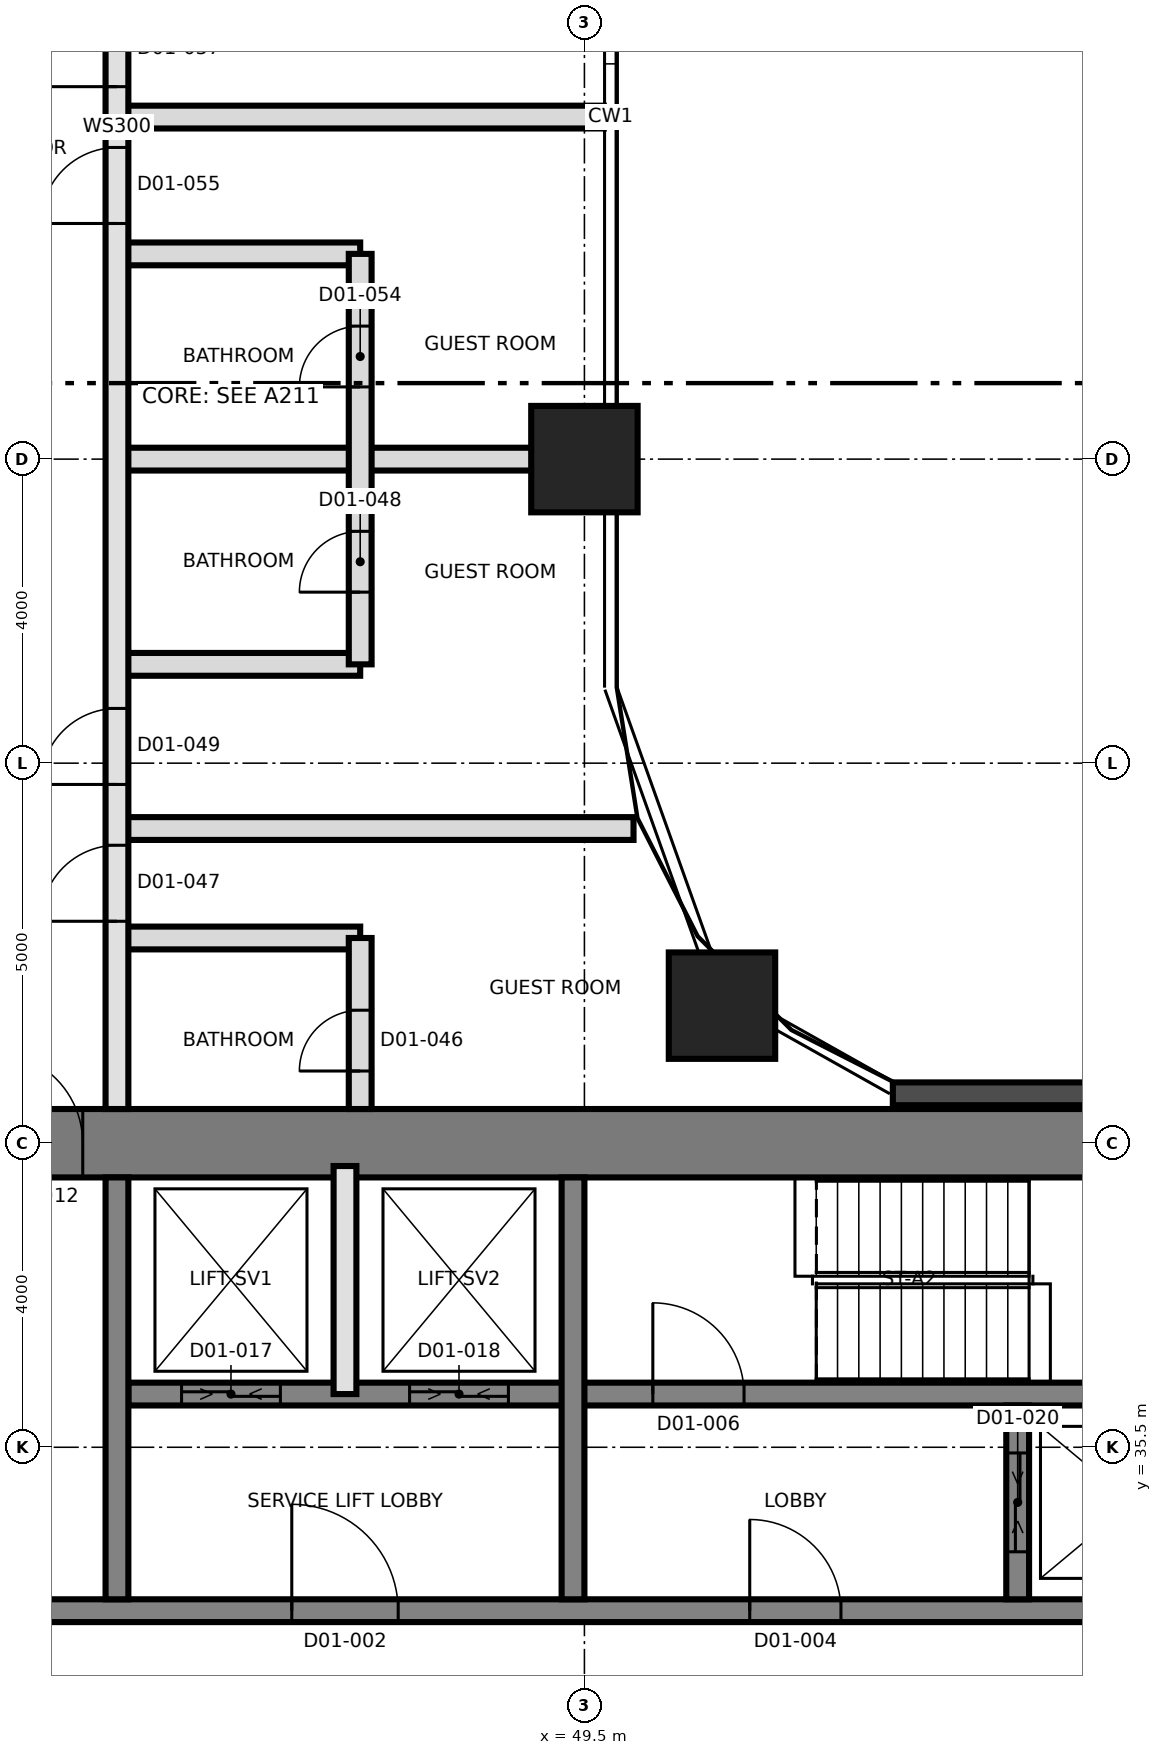
"""IFC4 building model, lengths in metres.
Left out: names, types, materials, properties, quantities, classifications, styles, units other than length and angle.
Written with IfcOpenShell. Run it as: python <this file> out.ifc"""

import sys

from ifc_helpers import new_model, si_unit, direction, frame, frame_2d, origin, origin_2d, place, context, subcontext, project, spatial, rectangle, extrude, element, fill, save


model = new_model("IFC4")
c1 = context("Model", 3, precision=1e-05, world=origin(), true_north=direction((0.0, 1.0)))
c2 = subcontext(c1, "Body", "Model", "MODEL_VIEW")
j1 = project(units=[si_unit("LENGTHUNIT", "METRE"), si_unit("PLANEANGLEUNIT", "RADIAN")], contexts=[c1])
p1 = place(None, origin())
s1 = spatial("IfcSite", under=j1, at=p1, CompositionType="ELEMENT")
p2 = place(p1, origin())
s2 = spatial("IfcBuilding", under=s1, at=p2, CompositionType="ELEMENT")
p3 = place(p2, frame((0.0, 0.0, 40.9)))
s3 = spatial("IfcBuildingStorey", under=s2, at=p3, CompositionType="ELEMENT", Elevation=40.9)
p4 = place(p3, frame((31.05, 39.5, 0.0), z_axis=(0.0, 0.0, 1.0), x_axis=(1.0, 0.0, 0.0)))
e1 = element("IfcWall", 1, at=p4, inside=s3, PredefinedType="SHEAR", context=c2, shape_type="SweptSolid", body=[
    extrude(rectangle(XDim=27.0, YDim=0.9, at=frame_2d((13.5, 0.0))), origin(), (0.0, 0.0, 1.0), 3.7),
])
p5 = place(p4, frame((10.65, 0.0, 0.0)))
e2 = element("IfcOpeningElement", 2, at=p5, cuts=e1, PredefinedType="OPENING", context=c2, shape_type="SweptSolid", body=[
    extrude(rectangle(XDim=1.2, YDim=2.1, at=frame_2d((0.6, 1.05))), frame((0.0, 0.46, 0.0), z_axis=(0.0, -1.0, 0.0), x_axis=(1.0, 0.0, 0.0)), (0.0, 0.0, 1.0), 0.92),
])
p6 = place(p3, frame((31.95, 33.35, 0.0), z_axis=(0.0, 0.0, 1.0), x_axis=(1.0, 0.0, 0.0)))
e3 = element("IfcWall", 3, at=p6, inside=s3, PredefinedType="SHEAR", context=c2, shape_type="SweptSolid", body=[
    extrude(rectangle(XDim=26.1, YDim=0.3, at=frame_2d((13.05, 0.0))), origin(), (0.0, 0.0, 1.0), 3.7),
])
p7 = place(p6, frame((13.7, 0.0, 0.0)))
e4 = element("IfcOpeningElement", 4, at=p7, cuts=e3, PredefinedType="OPENING", context=c2, shape_type="SweptSolid", body=[
    extrude(rectangle(XDim=1.4, YDim=2.1, at=frame_2d((0.7, 1.05))), frame((0.0, 0.16, 0.0), z_axis=(0.0, -1.0, 0.0), x_axis=(1.0, 0.0, 0.0)), (0.0, 0.0, 1.0), 0.32),
])
p8 = place(p6, frame((5.175, 0.0, 0.0)))
e5 = element("IfcOpeningElement", 5, at=p8, cuts=e3, PredefinedType="OPENING", context=c2, shape_type="SweptSolid", body=[
    extrude(rectangle(XDim=1.2, YDim=2.1, at=frame_2d((0.6, 1.05))), frame((0.0, 0.16, 0.0), z_axis=(0.0, -1.0, 0.0), x_axis=(1.0, 0.0, 0.0)), (0.0, 0.0, 1.0), 0.32),
])
p9 = place(p6, frame((19.725, 0.0, 0.0)))
e6 = element("IfcOpeningElement", 6, at=p9, cuts=e3, PredefinedType="OPENING", context=c2, shape_type="SweptSolid", body=[
    extrude(rectangle(XDim=1.2, YDim=2.1, at=frame_2d((0.6, 1.05))), frame((0.0, 0.16, 0.0), z_axis=(0.0, -1.0, 0.0), x_axis=(1.0, 0.0, 0.0)), (0.0, 0.0, 1.0), 0.32),
])
p10 = place(p3, frame((43.5, 36.2, 0.0), z_axis=(0.0, 0.0, 1.0), x_axis=(1.0, 0.0, 0.0)))
e7 = element("IfcWall", 7, at=p10, inside=s3, PredefinedType="SHEAR", context=c2, shape_type="SweptSolid", body=[
    extrude(rectangle(XDim=14.55, YDim=0.3, at=frame_2d((7.275, 0.0))), origin(), (0.0, 0.0, 1.0), 3.7),
])
p11 = place(p10, frame((6.9, 0.0, 0.0)))
e8 = element("IfcOpeningElement", 8, at=p11, cuts=e7, PredefinedType="OPENING", context=c2, shape_type="SweptSolid", body=[
    extrude(rectangle(XDim=1.2, YDim=2.1, at=frame_2d((0.6, 1.05))), frame((0.0, 0.16, 0.0), z_axis=(0.0, -1.0, 0.0), x_axis=(1.0, 0.0, 0.0)), (0.0, 0.0, 1.0), 0.32),
])
p12 = place(p10, frame((0.7, 0.0, 0.0)))
e9 = element("IfcOpeningElement", 9, at=p12, cuts=e7, PredefinedType="OPENING", context=c2, shape_type="SweptSolid", body=[
    extrude(rectangle(XDim=1.3, YDim=2.4, at=frame_2d((0.65, 1.2))), frame((0.0, 0.16, 0.0), z_axis=(0.0, -1.0, 0.0), x_axis=(1.0, 0.0, 0.0)), (0.0, 0.0, 1.0), 0.32),
])
p13 = place(p10, frame((3.7, 0.0, 0.0)))
e10 = element("IfcOpeningElement", 10, at=p13, cuts=e7, PredefinedType="OPENING", context=c2, shape_type="SweptSolid", body=[
    extrude(rectangle(XDim=1.3, YDim=2.4, at=frame_2d((0.65, 1.2))), frame((0.0, 0.16, 0.0), z_axis=(0.0, -1.0, 0.0), x_axis=(1.0, 0.0, 0.0)), (0.0, 0.0, 1.0), 0.32),
])
for number, where, z_axis, x_axis in (
    (11, (43.35, 33.5, 0.0), (0.0, 0.0, 1.0), (0.0, 1.0, 0.0)),
    (12, (49.35, 33.5, 0.0), (0.0, 0.0, 1.0), (0.0, 1.0, 0.0)),
):
    element("IfcWall", number, at=place(p3, frame(where, z_axis=z_axis, x_axis=x_axis)), inside=s3, PredefinedType="SHEAR", context=c2, shape_type="SweptSolid", body=[
        extrude(rectangle(XDim=5.55, YDim=0.3, at=frame_2d((2.775, 0.0))), origin(), (0.0, 0.0, 1.0), 3.7),
    ])
p14 = place(p3, frame((55.2, 33.5, 0.0), z_axis=(0.0, 0.0, 1.0), x_axis=(0.0, 1.0, 0.0)))
e13 = element("IfcWall", 13, at=p14, inside=s3, PredefinedType="SHEAR", context=c2, shape_type="SweptSolid", body=[
    extrude(rectangle(XDim=2.55, YDim=0.3, at=frame_2d((1.275, 0.0))), origin(), (0.0, 0.0, 1.0), 3.7),
])
p15 = place(p14, frame((0.625, 0.0, 0.0)))
e14 = element("IfcOpeningElement", 14, at=p15, cuts=e13, PredefinedType="OPENING", context=c2, shape_type="SweptSolid", body=[
    extrude(rectangle(XDim=1.3, YDim=2.4, at=frame_2d((0.65, 1.2))), frame((0.0, 0.16, 0.0), z_axis=(0.0, -1.0, 0.0), x_axis=(1.0, 0.0, 0.0)), (0.0, 0.0, 1.0), 0.32),
])
for number, where, z_axis, x_axis in (
    (15, (51.31, 41.31, 0.0), (0.0, 0.0, 1.0), (1.0, 0.0, 0.0)),
    (16, (49.5, 48.5, 0.0), (0.0, 0.0, 1.0), (1.0, 0.0, 0.0)),
):
    element("IfcColumn", number, at=place(p3, frame(where, z_axis=z_axis, x_axis=x_axis)), inside=s3, PredefinedType="COLUMN", context=c2, shape_type="SweptSolid", body=[
        extrude(rectangle(XDim=1.4, YDim=1.4, at=origin_2d()), origin(), (0.0, 0.0, 1.0), 3.7),
    ])
p16 = place(p3, frame((58.674, 40.15, 0.0), z_axis=(0.0, 0.0, 1.0), x_axis=(-1.0, 0.0, 0.0)))
e17 = element("IfcWall", 17, at=p16, inside=s3, PredefinedType="SOLIDWALL", context=c2, shape_type="SweptSolid", body=[
    extrude(rectangle(XDim=5.116, YDim=0.3, at=frame_2d((2.558, 0.0))), origin(), (0.0, 0.0, 1.0), 3.4),
])
p17 = place(p3, frame((46.35, 36.2, 0.0), z_axis=(0.0, 0.0, 1.0), x_axis=(0.0, 1.0, 0.0)))
e18 = element("IfcWall", 18, at=p17, inside=s3, PredefinedType="SOLIDWALL", context=c2, shape_type="SweptSolid", body=[
    extrude(rectangle(XDim=3.0, YDim=0.3, at=frame_2d((1.5, 0.0))), origin(), (0.0, 0.0, 1.0), 3.4),
])
p18 = place(p3, frame((43.35, 42.2, 0.0), z_axis=(0.0, 0.0, 1.0), x_axis=(1.0, 0.0, 0.0)))
e19 = element("IfcWall", 19, at=p18, inside=s3, PredefinedType="PARTITIONING", context=c2, shape_type="SweptSolid", body=[
    extrude(rectangle(XDim=3.2, YDim=0.3, at=frame_2d((1.6, 0.0))), origin(), (0.0, 0.0, 1.0), 3.4),
])
p19 = place(p3, frame((43.35, 43.64, 0.0), z_axis=(0.0, 0.0, 1.0), x_axis=(1.0, 0.0, 0.0)))
e20 = element("IfcWall", 20, at=p19, inside=s3, PredefinedType="PARTITIONING", context=c2, shape_type="SweptSolid", body=[
    extrude(rectangle(XDim=6.796, YDim=0.3, at=frame_2d((3.398, 0.0))), origin(), (0.0, 0.0, 1.0), 3.4),
])
p20 = place(p3, frame((43.35, 45.8, 0.0), z_axis=(0.0, 0.0, 1.0), x_axis=(1.0, 0.0, 0.0)))
e21 = element("IfcWall", 21, at=p20, inside=s3, PredefinedType="PARTITIONING", context=c2, shape_type="SweptSolid", body=[
    extrude(rectangle(XDim=3.2, YDim=0.3, at=frame_2d((1.6, 0.0))), origin(), (0.0, 0.0, 1.0), 3.4),
])
p21 = place(p3, frame((43.35, 48.5, 0.0), z_axis=(0.0, 0.0, 1.0), x_axis=(1.0, 0.0, 0.0)))
e22 = element("IfcWall", 22, at=p21, inside=s3, PredefinedType="PARTITIONING", context=c2, shape_type="SweptSolid", body=[
    extrude(rectangle(XDim=6.225, YDim=0.3, at=frame_2d((3.112, 0.0))), origin(), (0.0, 0.0, 1.0), 3.4),
])
p22 = place(p3, frame((43.35, 51.2, 0.0), z_axis=(0.0, 0.0, 1.0), x_axis=(1.0, 0.0, 0.0)))
e23 = element("IfcWall", 23, at=p22, inside=s3, PredefinedType="PARTITIONING", context=c2, shape_type="SweptSolid", body=[
    extrude(rectangle(XDim=3.2, YDim=0.3, at=frame_2d((1.6, 0.0))), origin(), (0.0, 0.0, 1.0), 3.4),
])
p23 = place(p3, frame((43.35, 53.0, 0.0), z_axis=(0.0, 0.0, 1.0), x_axis=(1.0, 0.0, 0.0)))
e24 = element("IfcWall", 24, at=p23, inside=s3, PredefinedType="PARTITIONING", context=c2, shape_type="SweptSolid", body=[
    extrude(rectangle(XDim=6.405, YDim=0.3, at=frame_2d((3.202, 0.0))), origin(), (0.0, 0.0, 1.0), 3.4),
])
p24 = place(p3, frame((43.35, 39.95, 0.0), z_axis=(0.0, 0.0, 1.0), x_axis=(0.0, 1.0, 0.0)))
e25 = element("IfcWall", 25, at=p24, inside=s3, PredefinedType="SOLIDWALL", context=c2, shape_type="SweptSolid", body=[
    extrude(rectangle(XDim=25.85, YDim=0.3, at=frame_2d((12.925, 0.0))), origin(), (0.0, 0.0, 1.0), 3.4),
])
p25 = place(p24, frame((2.47, 0.0, 0.0)))
e26 = element("IfcOpeningElement", 26, at=p25, cuts=e25, PredefinedType="OPENING", context=c2, shape_type="SweptSolid", body=[
    extrude(rectangle(XDim=1.0, YDim=2.1, at=frame_2d((0.5, 1.05))), frame((0.0, 0.16, 0.0), z_axis=(0.0, -1.0, 0.0), x_axis=(1.0, 0.0, 0.0)), (0.0, 0.0, 1.0), 0.32),
])
p26 = place(p24, frame((4.27, 0.0, 0.0)))
e27 = element("IfcOpeningElement", 27, at=p26, cuts=e25, PredefinedType="OPENING", context=c2, shape_type="SweptSolid", body=[
    extrude(rectangle(XDim=1.0, YDim=2.1, at=frame_2d((0.5, 1.05))), frame((0.0, 0.16, 0.0), z_axis=(0.0, -1.0, 0.0), x_axis=(1.0, 0.0, 0.0)), (0.0, 0.0, 1.0), 0.32),
])
p27 = place(p24, frame((11.65, 0.0, 0.0)))
e28 = element("IfcOpeningElement", 28, at=p27, cuts=e25, PredefinedType="OPENING", context=c2, shape_type="SweptSolid", body=[
    extrude(rectangle(XDim=1.0, YDim=2.1, at=frame_2d((0.5, 1.05))), frame((0.0, 0.16, 0.0), z_axis=(0.0, -1.0, 0.0), x_axis=(1.0, 0.0, 0.0)), (0.0, 0.0, 1.0), 0.32),
])
p28 = place(p24, frame((13.45, 0.0, 0.0)))
e29 = element("IfcOpeningElement", 29, at=p28, cuts=e25, PredefinedType="OPENING", context=c2, shape_type="SweptSolid", body=[
    extrude(rectangle(XDim=1.0, YDim=2.1, at=frame_2d((0.5, 1.05))), frame((0.0, 0.16, 0.0), z_axis=(0.0, -1.0, 0.0), x_axis=(1.0, 0.0, 0.0)), (0.0, 0.0, 1.0), 0.32),
])
p29 = place(p24, frame((21.1, 0.0, 0.0)))
e30 = element("IfcOpeningElement", 30, at=p29, cuts=e25, PredefinedType="OPENING", context=c2, shape_type="SweptSolid", body=[
    extrude(rectangle(XDim=1.0, YDim=2.4, at=frame_2d((0.5, 1.2))), frame((0.0, 0.16, 0.0), z_axis=(0.0, -1.0, 0.0), x_axis=(1.0, 0.0, 0.0)), (0.0, 0.0, 1.0), 0.32),
])
p30 = place(p3, frame((46.55, 39.95, 0.0), z_axis=(0.0, 0.0, 1.0), x_axis=(0.0, 1.0, 0.0)))
e31 = element("IfcWall", 31, at=p30, inside=s3, PredefinedType="PARTITIONING", context=c2, shape_type="SweptSolid", body=[
    extrude(rectangle(XDim=2.25, YDim=0.3, at=frame_2d((1.125, 0.0))), origin(), (0.0, 0.0, 1.0), 3.4),
])
p31 = place(p30, frame((0.5, 0.0, 0.0)))
e32 = element("IfcOpeningElement", 32, at=p31, cuts=e31, PredefinedType="OPENING", context=c2, shape_type="SweptSolid", body=[
    extrude(rectangle(XDim=0.8, YDim=2.1, at=frame_2d((0.4, 1.05))), frame((0.0, 0.16, 0.0), z_axis=(0.0, -1.0, 0.0), x_axis=(1.0, 0.0, 0.0)), (0.0, 0.0, 1.0), 0.32),
])
p32 = place(p3, frame((46.55, 45.8, 0.0), z_axis=(0.0, 0.0, 1.0), x_axis=(0.0, 1.0, 0.0)))
e33 = element("IfcWall", 33, at=p32, inside=s3, PredefinedType="PARTITIONING", context=c2, shape_type="SweptSolid", body=[
    extrude(rectangle(XDim=5.4, YDim=0.3, at=frame_2d((2.7, 0.0))), origin(), (0.0, 0.0, 1.0), 3.4),
])
p33 = place(p32, frame((0.95, 0.0, 0.0)))
e34 = element("IfcOpeningElement", 34, at=p33, cuts=e33, PredefinedType="OPENING", context=c2, shape_type="SweptSolid", body=[
    extrude(rectangle(XDim=0.8, YDim=2.1, at=frame_2d((0.4, 1.05))), frame((0.0, 0.16, 0.0), z_axis=(0.0, -1.0, 0.0), x_axis=(1.0, 0.0, 0.0)), (0.0, 0.0, 1.0), 0.32),
])
p34 = place(p32, frame((3.65, 0.0, 0.0)))
e35 = element("IfcOpeningElement", 35, at=p34, cuts=e33, PredefinedType="OPENING", context=c2, shape_type="SweptSolid", body=[
    extrude(rectangle(XDim=0.8, YDim=2.1, at=frame_2d((0.4, 1.05))), frame((0.0, 0.16, 0.0), z_axis=(0.0, -1.0, 0.0), x_axis=(1.0, 0.0, 0.0)), (0.0, 0.0, 1.0), 0.32),
])
p35 = place(p7, origin())
e36 = element("IfcDoor", 36, at=p35, inside=s3, OperationType="SINGLE_SWING_RIGHT", PredefinedType="DOOR", context=c2, shape_type="SweptSolid", body=[
    extrude(rectangle(XDim=1.4, YDim=2.1, at=frame_2d((0.7, 1.05))), frame((0.0, 0.025, 0.0), z_axis=(0.0, -1.0, 0.0), x_axis=(1.0, 0.0, 0.0)), (0.0, 0.0, 1.0), 0.05),
])
fill(e4, e36)
p36 = place(p9, origin())
e37 = element("IfcDoor", 37, at=p36, inside=s3, OperationType="SINGLE_SWING_RIGHT", PredefinedType="DOOR", context=c2, shape_type="SweptSolid", body=[
    extrude(rectangle(XDim=1.2, YDim=2.1, at=frame_2d((0.6, 1.05))), frame((0.0, 0.025, 0.0), z_axis=(0.0, -1.0, 0.0), x_axis=(1.0, 0.0, 0.0)), (0.0, 0.0, 1.0), 0.05),
])
fill(e6, e37)
p37 = place(p11, origin())
e38 = element("IfcDoor", 38, at=p37, inside=s3, OperationType="SINGLE_SWING_LEFT", PredefinedType="DOOR", context=c2, shape_type="SweptSolid", body=[
    extrude(rectangle(XDim=1.2, YDim=2.1, at=frame_2d((0.6, 1.05))), frame((0.0, 0.025, 0.0), z_axis=(0.0, -1.0, 0.0), x_axis=(1.0, 0.0, 0.0)), (0.0, 0.0, 1.0), 0.05),
])
fill(e8, e38)
p38 = place(p5, origin())
e39 = element("IfcDoor", 39, at=p38, inside=s3, OperationType="SINGLE_SWING_RIGHT", PredefinedType="DOOR", context=c2, shape_type="SweptSolid", body=[
    extrude(rectangle(XDim=1.2, YDim=2.1, at=frame_2d((0.6, 1.05))), frame((0.0, 0.025, 0.0), z_axis=(0.0, -1.0, 0.0), x_axis=(1.0, 0.0, 0.0)), (0.0, 0.0, 1.0), 0.05),
])
fill(e2, e39)
p39 = place(p12, origin())
e40 = element("IfcDoor", 40, at=p39, inside=s3, OperationType="SLIDING_TO_LEFT", PredefinedType="DOOR", context=c2, shape_type="SweptSolid", body=[
    extrude(rectangle(XDim=1.3, YDim=2.4, at=frame_2d((0.65, 1.2))), frame((0.0, 0.025, 0.0), z_axis=(0.0, -1.0, 0.0), x_axis=(1.0, 0.0, 0.0)), (0.0, 0.0, 1.0), 0.05),
])
fill(e9, e40)
p40 = place(p13, origin())
e41 = element("IfcDoor", 41, at=p40, inside=s3, OperationType="SLIDING_TO_LEFT", PredefinedType="DOOR", context=c2, shape_type="SweptSolid", body=[
    extrude(rectangle(XDim=1.3, YDim=2.4, at=frame_2d((0.65, 1.2))), frame((0.0, 0.025, 0.0), z_axis=(0.0, -1.0, 0.0), x_axis=(1.0, 0.0, 0.0)), (0.0, 0.0, 1.0), 0.05),
])
fill(e10, e41)
p41 = place(p15, origin())
e42 = element("IfcDoor", 42, at=p41, inside=s3, OperationType="SLIDING_TO_LEFT", PredefinedType="DOOR", context=c2, shape_type="SweptSolid", body=[
    extrude(rectangle(XDim=1.3, YDim=2.4, at=frame_2d((0.65, 1.2))), frame((0.0, 0.025, 0.0), z_axis=(0.0, -1.0, 0.0), x_axis=(1.0, 0.0, 0.0)), (0.0, 0.0, 1.0), 0.05),
])
fill(e14, e42)
p42 = place(p31, origin())
e43 = element("IfcDoor", 43, at=p42, inside=s3, OperationType="SINGLE_SWING_RIGHT", PredefinedType="DOOR", context=c2, shape_type="SweptSolid", body=[
    extrude(rectangle(XDim=0.8, YDim=2.1, at=frame_2d((0.4, 1.05))), frame((0.0, 0.025, 0.0), z_axis=(0.0, -1.0, 0.0), x_axis=(1.0, 0.0, 0.0)), (0.0, 0.0, 1.0), 0.05),
])
fill(e32, e43)
p43 = place(p25, origin())
e44 = element("IfcDoor", 44, at=p43, inside=s3, OperationType="SINGLE_SWING_LEFT", PredefinedType="DOOR", context=c2, shape_type="SweptSolid", body=[
    extrude(rectangle(XDim=1.0, YDim=2.1, at=frame_2d((0.5, 1.05))), frame((0.0, 0.025, 0.0), z_axis=(0.0, -1.0, 0.0), x_axis=(1.0, 0.0, 0.0)), (0.0, 0.0, 1.0), 0.05),
])
fill(e26, e44)
p44 = place(p33, origin())
e45 = element("IfcDoor", 45, at=p44, inside=s3, OperationType="SINGLE_SWING_LEFT", PredefinedType="DOOR", context=c2, shape_type="SweptSolid", body=[
    extrude(rectangle(XDim=0.8, YDim=2.1, at=frame_2d((0.4, 1.05))), frame((0.0, 0.025, 0.0), z_axis=(0.0, -1.0, 0.0), x_axis=(1.0, 0.0, 0.0)), (0.0, 0.0, 1.0), 0.05),
])
fill(e34, e45)
p45 = place(p26, origin())
e46 = element("IfcDoor", 46, at=p45, inside=s3, OperationType="SINGLE_SWING_LEFT", PredefinedType="DOOR", context=c2, shape_type="SweptSolid", body=[
    extrude(rectangle(XDim=1.0, YDim=2.1, at=frame_2d((0.5, 1.05))), frame((0.0, 0.025, 0.0), z_axis=(0.0, -1.0, 0.0), x_axis=(1.0, 0.0, 0.0)), (0.0, 0.0, 1.0), 0.05),
])
fill(e27, e46)
p46 = place(p34, origin())
e47 = element("IfcDoor", 47, at=p46, inside=s3, OperationType="SINGLE_SWING_LEFT", PredefinedType="DOOR", context=c2, shape_type="SweptSolid", body=[
    extrude(rectangle(XDim=0.8, YDim=2.1, at=frame_2d((0.4, 1.05))), frame((0.0, 0.025, 0.0), z_axis=(0.0, -1.0, 0.0), x_axis=(1.0, 0.0, 0.0)), (0.0, 0.0, 1.0), 0.05),
])
fill(e35, e47)
p47 = place(p27, origin())
e48 = element("IfcDoor", 48, at=p47, inside=s3, OperationType="SINGLE_SWING_LEFT", PredefinedType="DOOR", context=c2, shape_type="SweptSolid", body=[
    extrude(rectangle(XDim=1.0, YDim=2.1, at=frame_2d((0.5, 1.05))), frame((0.0, 0.025, 0.0), z_axis=(0.0, -1.0, 0.0), x_axis=(1.0, 0.0, 0.0)), (0.0, 0.0, 1.0), 0.05),
])
fill(e28, e48)
p48 = place(p28, origin())
e49 = element("IfcDoor", 49, at=p48, inside=s3, OperationType="SINGLE_SWING_RIGHT", PredefinedType="DOOR", context=c2, shape_type="SweptSolid", body=[
    extrude(rectangle(XDim=1.0, YDim=2.1, at=frame_2d((0.5, 1.05))), frame((0.0, 0.025, 0.0), z_axis=(0.0, -1.0, 0.0), x_axis=(1.0, 0.0, 0.0)), (0.0, 0.0, 1.0), 0.05),
])
fill(e29, e49)
save(model, sys.argv[1])
